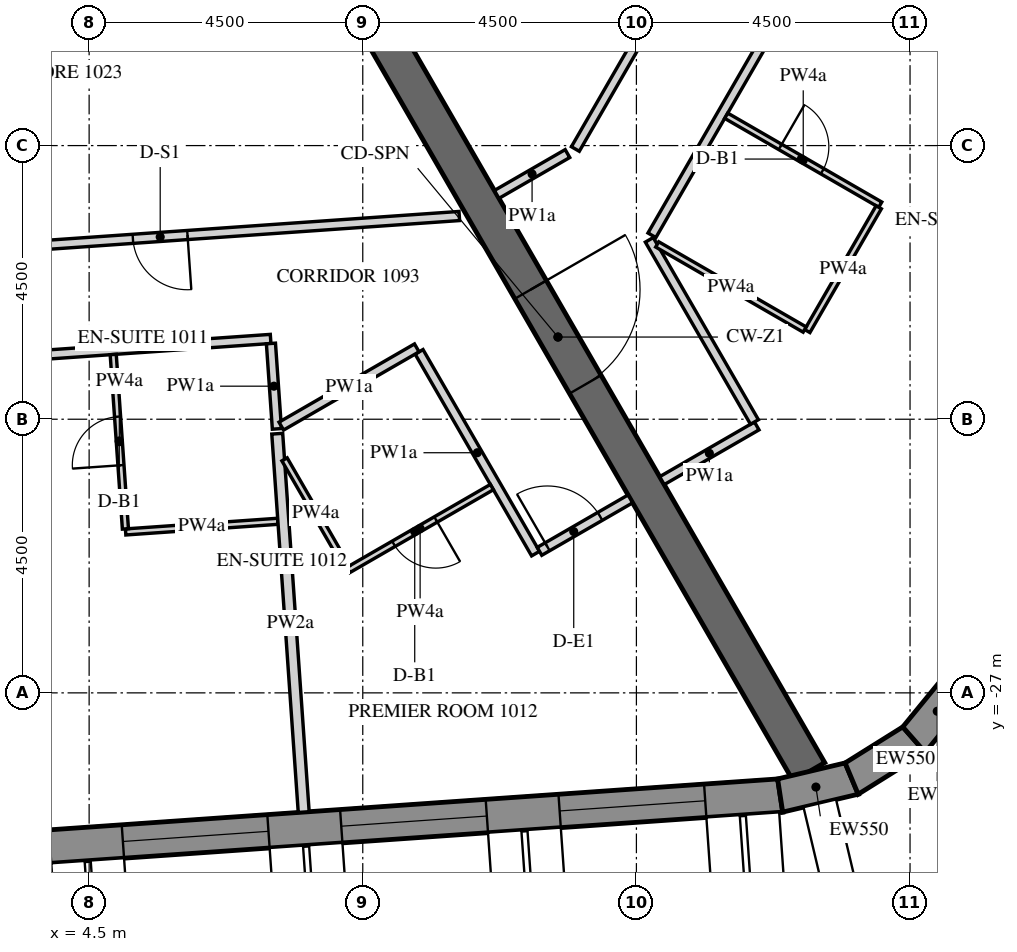
"""IFC4 building model, lengths in metres.
Left out: names, types, materials, properties, quantities, classifications, styles, units other than length and angle.
Written with IfcOpenShell. Run it as: python <this file> out.ifc"""

import sys

from ifc_helpers import new_model, si_unit, direction, frame, frame_2d, origin, place, context, subcontext, project, spatial, polyline, rectangle, outline, extrude, element, fill, save


model = new_model("IFC4")
c1 = context("Model", 3, precision=1e-05, world=origin(), true_north=direction((0.0, 1.0)))
c2 = subcontext(c1, "Body", "Model", "MODEL_VIEW")
j1 = project(units=[si_unit("LENGTHUNIT", "METRE"), si_unit("PLANEANGLEUNIT", "RADIAN")], contexts=[c1])
p1 = place(None, origin())
s1 = spatial("IfcSite", under=j1, at=p1, CompositionType="ELEMENT")
p2 = place(p1, origin())
s2 = spatial("IfcBuilding", under=s1, at=p2, CompositionType="ELEMENT")
p3 = place(p2, frame((0.0, 0.0, 135.0)))
s3 = spatial("IfcBuildingStorey", under=s2, at=p3, CompositionType="ELEMENT", Elevation=135.0)
p4 = place(p3, frame((-14.134, -30.786, -0.15), z_axis=(0.0, 0.0, 1.0), x_axis=(0.997564037441, 0.069756657061, 0.0)))
e1 = element("IfcWall", 1, at=p4, inside=s3, PredefinedType="SOLIDWALL", context=c2, shape_type="SweptSolid", body=[
    extrude(outline(polyline([(-0.026, -0.275), (30.094, -0.275), (30.049, 0.275), (0.026, 0.275), (-0.026, -0.275)])), origin(), (0.0, 0.0, 1.0), 3.9),
])
p5 = place(p4, frame((1.236, 0.0, 1.05)))
e2 = element("IfcOpeningElement", 2, at=p5, cuts=e1, PredefinedType="OPENING", context=c2, shape_type="SweptSolid", body=[
    extrude(rectangle(XDim=2.4, YDim=2.4, at=frame_2d((1.2, 1.2))), frame((0.0, 0.285, 0.0), z_axis=(0.0, -1.0, 0.0), x_axis=(1.0, 0.0, 0.0)), (0.0, 0.0, 1.0), 0.57),
])
p6 = place(p4, frame((4.835, 0.0, 1.05)))
e3 = element("IfcOpeningElement", 3, at=p6, cuts=e1, PredefinedType="OPENING", context=c2, shape_type="SweptSolid", body=[
    extrude(rectangle(XDim=2.4, YDim=2.4, at=frame_2d((1.2, 1.2))), frame((0.0, 0.285, 0.0), z_axis=(0.0, -1.0, 0.0), x_axis=(1.0, 0.0, 0.0)), (0.0, 0.0, 1.0), 0.57),
])
p7 = place(p4, frame((8.436, 0.0, 1.05)))
e4 = element("IfcOpeningElement", 4, at=p7, cuts=e1, PredefinedType="OPENING", context=c2, shape_type="SweptSolid", body=[
    extrude(rectangle(XDim=2.4, YDim=2.4, at=frame_2d((1.2, 1.2))), frame((0.0, 0.285, 0.0), z_axis=(0.0, -1.0, 0.0), x_axis=(1.0, 0.0, 0.0)), (0.0, 0.0, 1.0), 0.57),
])
p8 = place(p4, frame((12.035, 0.0, 1.05)))
e5 = element("IfcOpeningElement", 5, at=p8, cuts=e1, PredefinedType="OPENING", context=c2, shape_type="SweptSolid", body=[
    extrude(rectangle(XDim=2.4, YDim=2.4, at=frame_2d((1.2, 1.2))), frame((0.0, 0.285, 0.0), z_axis=(0.0, -1.0, 0.0), x_axis=(1.0, 0.0, 0.0)), (0.0, 0.0, 1.0), 0.57),
])
p9 = place(p4, frame((15.635, 0.0, 1.05)))
e6 = element("IfcOpeningElement", 6, at=p9, cuts=e1, PredefinedType="OPENING", context=c2, shape_type="SweptSolid", body=[
    extrude(rectangle(XDim=2.4, YDim=2.4, at=frame_2d((1.2, 1.2))), frame((0.0, 0.285, 0.0), z_axis=(0.0, -1.0, 0.0), x_axis=(1.0, 0.0, 0.0)), (0.0, 0.0, 1.0), 0.57),
])
p10 = place(p4, frame((19.236, 0.0, 1.05)))
e7 = element("IfcOpeningElement", 7, at=p10, cuts=e1, PredefinedType="OPENING", context=c2, shape_type="SweptSolid", body=[
    extrude(rectangle(XDim=2.4, YDim=2.4, at=frame_2d((1.2, 1.2))), frame((0.0, 0.285, 0.0), z_axis=(0.0, -1.0, 0.0), x_axis=(1.0, 0.0, 0.0)), (0.0, 0.0, 1.0), 0.57),
])
p11 = place(p4, frame((22.835, 0.0, 1.05)))
e8 = element("IfcOpeningElement", 8, at=p11, cuts=e1, PredefinedType="OPENING", context=c2, shape_type="SweptSolid", body=[
    extrude(rectangle(XDim=2.4, YDim=2.4, at=frame_2d((1.2, 1.2))), frame((0.0, 0.285, 0.0), z_axis=(0.0, -1.0, 0.0), x_axis=(1.0, 0.0, 0.0)), (0.0, 0.0, 1.0), 0.57),
])
p12 = place(p4, frame((26.436, 0.0, 1.05)))
e9 = element("IfcOpeningElement", 9, at=p12, cuts=e1, PredefinedType="OPENING", context=c2, shape_type="SweptSolid", body=[
    extrude(rectangle(XDim=2.4, YDim=2.4, at=frame_2d((1.2, 1.2))), frame((0.0, 0.285, 0.0), z_axis=(0.0, -1.0, 0.0), x_axis=(1.0, 0.0, 0.0)), (0.0, 0.0, 1.0), 0.57),
])
p13 = place(p3, frame((15.864, -28.688, -0.15), z_axis=(0.0, 0.0, 1.0), x_axis=(0.973063591128, 0.230536868247, 0.0)))
e10 = element("IfcWall", 10, at=p13, inside=s3, PredefinedType="SOLIDWALL", context=c2, shape_type="SweptSolid", body=[
    extrude(outline(polyline([(-0.022, -0.275), (1.253, -0.275), (1.163, 0.275), (0.022, 0.275), (-0.022, -0.275)])), origin(), (0.0, 0.0, 1.0), 3.9),
])
p14 = place(p3, frame((17.04, -28.41, -0.15), z_axis=(0.0, 0.0, 1.0), x_axis=(0.847952888306, 0.530071598195, 0.0)))
e11 = element("IfcWall", 11, at=p14, inside=s3, PredefinedType="SOLIDWALL", context=c2, shape_type="SweptSolid", body=[
    extrude(outline(polyline([(-0.045, -0.275), (1.253, -0.275), (1.163, 0.275), (0.045, 0.275), (-0.045, -0.275)])), origin(), (0.0, 0.0, 1.0), 3.9),
])
p15 = place(p3, frame((18.064, -27.769, -0.15), z_axis=(0.0, 0.0, 1.0), x_axis=(0.633842757806, 0.773461930787, 0.0)))
e12 = element("IfcWall", 12, at=p15, inside=s3, PredefinedType="SOLIDWALL", context=c2, shape_type="SweptSolid", body=[
    extrude(outline(polyline([(-0.045, -0.275), (1.231, -0.275), (1.186, 0.275), (0.045, 0.275), (-0.045, -0.275)])), origin(), (0.0, 0.0, 1.0), 3.9),
])
p16 = place(p3, frame((8.083, -14.0, -0.15), z_axis=(0.0, 0.0, 1.0), x_axis=(0.499997680643, -0.866026742862, 0.0)))
e13 = element("IfcWall", 13, at=p16, inside=s3, PredefinedType="SHEAR", context=c2, shape_type="SweptSolid", body=[
    extrude(rectangle(XDim=16.509, YDim=0.6, at=frame_2d((8.254, 0.0))), origin(), (0.0, 0.0, 1.0), 3.9),
])
p17 = place(p16, frame((7.354, 0.0, 0.15)))
e14 = element("IfcOpeningElement", 14, at=p17, cuts=e13, PredefinedType="OPENING", context=c2, shape_type="SweptSolid", body=[
    extrude(rectangle(XDim=1.8, YDim=2.4, at=frame_2d((0.9, 1.2))), frame((0.0, 0.31, 0.0), z_axis=(0.0, -1.0, 0.0), x_axis=(1.0, 0.0, 0.0)), (0.0, 0.0, 1.0), 0.62),
])
p18 = place(p3, frame((-11.902, -22.535, 0.0), z_axis=(0.0, 0.0, 1.0), x_axis=(0.997563830208, 0.069759620556, 0.0)))
e15 = element("IfcWall", 15, at=p18, inside=s3, PredefinedType="PARTITIONING", context=c2, shape_type="SweptSolid", body=[
    extrude(rectangle(XDim=19.434, YDim=0.15, at=frame_2d((9.717, 0.0))), origin(), (0.0, 0.0, 1.0), 2.838),
])
p19 = place(p18, frame((2.575, 0.0, 0.0)))
e16 = element("IfcOpeningElement", 16, at=p19, cuts=e15, PredefinedType="OPENING", context=c2, shape_type="SweptSolid", body=[
    extrude(rectangle(XDim=1.0, YDim=2.1, at=frame_2d((0.5, 1.05))), frame((0.0, 0.085, 0.0), z_axis=(0.0, -1.0, 0.0), x_axis=(1.0, 0.0, 0.0)), (0.0, 0.0, 1.0), 0.17),
])
p20 = place(p18, frame((12.234, 0.0, 0.0)))
e17 = element("IfcOpeningElement", 17, at=p20, cuts=e15, PredefinedType="OPENING", context=c2, shape_type="SweptSolid", body=[
    extrude(rectangle(XDim=1.0, YDim=2.1, at=frame_2d((0.5, 1.05))), frame((0.0, 0.085, 0.0), z_axis=(0.0, -1.0, 0.0), x_axis=(1.0, 0.0, 0.0)), (0.0, 0.0, 1.0), 0.17),
])
p21 = place(p3, frame((7.49, -21.254, 0.0), z_axis=(0.0, 0.0, 1.0), x_axis=(0.069718673592, -0.997566692784, 0.0)))
e18 = element("IfcWall", 18, at=p21, inside=s3, PredefinedType="PARTITIONING", context=c2, shape_type="SweptSolid", body=[
    extrude(rectangle(XDim=1.408, YDim=0.15, at=frame_2d((0.704, 0.0))), origin(), (0.0, 0.0, 1.0), 2.838),
])
p22 = place(p3, frame((9.926, -21.392, 0.0), z_axis=(0.0, 0.0, 1.0), x_axis=(0.500031306162, -0.866007328409, 0.0)))
e19 = element("IfcWall", 19, at=p22, inside=s3, PredefinedType="PARTITIONING", context=c2, shape_type="SweptSolid", body=[
    extrude(rectangle(XDim=3.832, YDim=0.15, at=frame_2d((1.916, 0.0))), origin(), (0.0, 0.0, 1.0), 2.838),
])
p23 = place(p3, frame((11.906, -24.673, 0.0), z_axis=(0.0, 0.0, 1.0), x_axis=(0.866013532718, 0.500020560727, 0.0)))
e20 = element("IfcWall", 20, at=p23, inside=s3, PredefinedType="PARTITIONING", context=c2, shape_type="SweptSolid", body=[
    extrude(rectangle(XDim=1.725, YDim=0.15, at=frame_2d((0.863, 0.0))), origin(), (0.0, 0.0, 1.0), 2.838),
])
p24 = place(p23, frame((0.15, 0.0, 0.0)))
e21 = element("IfcOpeningElement", 21, at=p24, cuts=e20, PredefinedType="OPENING", context=c2, shape_type="SweptSolid", body=[
    extrude(rectangle(XDim=1.0, YDim=2.1, at=frame_2d((0.5, 1.05))), frame((0.0, 0.085, 0.0), z_axis=(0.0, -1.0, 0.0), x_axis=(1.0, 0.0, 0.0)), (0.0, 0.0, 1.0), 0.17),
])
p25 = place(p3, frame((7.66, -22.613, 0.0), z_axis=(0.0, 0.0, 1.0), x_axis=(0.866003870164, 0.500037295471, 0.0)))
e22 = element("IfcWall", 22, at=p25, inside=s3, PredefinedType="PARTITIONING", context=c2, shape_type="SweptSolid", body=[
    extrude(rectangle(XDim=2.573, YDim=0.15, at=frame_2d((1.287, 0.0))), origin(), (0.0, 0.0, 1.0), 2.838),
])
p26 = place(p3, frame((10.587, -19.158, 0.0), z_axis=(0.0, 0.0, 1.0), x_axis=(-0.997565137136, -0.069740928955, 0.0)))
e23 = element("IfcWall", 23, at=p26, inside=s3, PredefinedType="PARTITIONING", context=c2, shape_type="SweptSolid", body=[
    extrude(rectangle(XDim=9.861, YDim=0.15, at=frame_2d((4.931, 0.0))), origin(), (0.0, 0.0, 1.0), 2.838),
])
p27 = place(p26, frame((4.481, 0.0, 0.0)))
e24 = element("IfcOpeningElement", 24, at=p27, cuts=e23, PredefinedType="OPENING", context=c2, shape_type="SweptSolid", body=[
    extrude(rectangle(XDim=0.9, YDim=2.1, at=frame_2d((0.45, 1.05))), frame((0.0, 0.085, 0.0), z_axis=(0.0, -1.0, 0.0), x_axis=(1.0, 0.0, 0.0)), (0.0, 0.0, 1.0), 0.17),
])
p28 = place(p3, frame((13.92, -23.51, 0.0), z_axis=(0.0, 0.0, 1.0), x_axis=(0.866047807691, 0.499961193289, 0.0)))
e25 = element("IfcWall", 25, at=p28, inside=s3, PredefinedType="PARTITIONING", context=c2, shape_type="SweptSolid", body=[
    extrude(rectangle(XDim=1.8, YDim=0.15, at=frame_2d((0.9, 0.0))), origin(), (0.0, 0.0, 1.0), 2.838),
])
p29 = place(p3, frame((15.441, -22.545, 0.0), z_axis=(0.0, 0.0, 1.0), x_axis=(-0.500003541824, 0.866023358902, 0.0)))
e26 = element("IfcWall", 26, at=p29, inside=s3, PredefinedType="PARTITIONING", context=c2, shape_type="SweptSolid", body=[
    extrude(rectangle(XDim=3.458, YDim=0.15, at=frame_2d((1.729, 0.0))), origin(), (0.0, 0.0, 1.0), 2.838),
])
p30 = place(p3, frame((13.755, -19.475, 0.0), z_axis=(0.0, 0.0, 1.0), x_axis=(0.50000013933, 0.866025323342, 0.0)))
e27 = element("IfcWall", 27, at=p30, inside=s3, PredefinedType="PARTITIONING", context=c2, shape_type="SweptSolid", body=[
    extrude(rectangle(XDim=23.517, YDim=0.15, at=frame_2d((11.758, 0.0))), origin(), (0.0, 0.0, 1.0), 2.838),
])
p31 = place(p30, frame((4.456, 0.0, 0.0)))
e28 = element("IfcOpeningElement", 28, at=p31, cuts=e27, PredefinedType="OPENING", context=c2, shape_type="SweptSolid", body=[
    extrude(rectangle(XDim=1.0, YDim=2.1, at=frame_2d((0.5, 1.05))), frame((0.0, 0.085, 0.0), z_axis=(0.0, -1.0, 0.0), x_axis=(1.0, 0.0, 0.0)), (0.0, 0.0, 1.0), 0.17),
])
p32 = place(p30, frame((13.699, 0.0, 0.0)))
e29 = element("IfcOpeningElement", 29, at=p32, cuts=e27, PredefinedType="OPENING", context=c2, shape_type="SweptSolid", body=[
    extrude(rectangle(XDim=1.0, YDim=2.1, at=frame_2d((0.5, 1.05))), frame((0.0, 0.085, 0.0), z_axis=(0.0, -1.0, 0.0), x_axis=(1.0, 0.0, 0.0)), (0.0, 0.0, 1.0), 0.17),
])
p33 = place(p30, frame((21.658, 0.0, 0.0)))
e30 = element("IfcOpeningElement", 30, at=p33, cuts=e27, PredefinedType="OPENING", context=c2, shape_type="SweptSolid", body=[
    extrude(rectangle(XDim=1.0, YDim=2.1, at=frame_2d((0.5, 1.05))), frame((0.0, 0.085, 0.0), z_axis=(0.0, -1.0, 0.0), x_axis=(1.0, 0.0, 0.0)), (0.0, 0.0, 1.0), 0.17),
])
p34 = place(p3, frame((16.643, -10.874, 0.0), z_axis=(0.0, 0.0, 1.0), x_axis=(-0.50000192383, -0.866024293058, 0.0)))
e31 = element("IfcWall", 31, at=p34, inside=s3, PredefinedType="PARTITIONING", context=c2, shape_type="SweptSolid", body=[
    extrude(rectangle(XDim=8.293, YDim=0.15, at=frame_2d((4.146, 0.0))), origin(), (0.0, 0.0, 1.0), 2.838),
])
p35 = place(p34, frame((3.697, 0.0, 0.0)))
e32 = element("IfcOpeningElement", 32, at=p35, cuts=e31, PredefinedType="OPENING", context=c2, shape_type="SweptSolid", body=[
    extrude(rectangle(XDim=0.9, YDim=2.1, at=frame_2d((0.45, 1.05))), frame((0.0, 0.085, 0.0), z_axis=(0.0, -1.0, 0.0), x_axis=(1.0, 0.0, 0.0)), (0.0, 0.0, 1.0), 0.17),
])
p36 = place(p3, frame((12.366, -18.131, 0.0), z_axis=(0.0, 0.0, 1.0), x_axis=(-0.866043397086, -0.499968833392, 0.0)))
e33 = element("IfcWall", 33, at=p36, inside=s3, PredefinedType="PARTITIONING", context=c2, shape_type="SweptSolid", body=[
    extrude(rectangle(XDim=1.344, YDim=0.15, at=frame_2d((0.672, 0.0))), origin(), (0.0, 0.0, 1.0), 2.838),
])
p37 = place(p3, frame((7.604, -24.178, 0.0), z_axis=(0.0, 0.0, 1.0), x_axis=(-0.997565196586, -0.069740078583, 0.0)))
e34 = element("IfcWall", 34, at=p37, inside=s3, PredefinedType="PARTITIONING", context=c2, shape_type="SweptSolid", body=[
    extrude(rectangle(XDim=2.51, YDim=0.1, at=frame_2d((1.255, 0.0))), origin(), (0.0, 0.0, 1.0), 2.838),
])
p38 = place(p3, frame((5.097, -24.304, 0.0), z_axis=(0.0, 0.0, 1.0), x_axis=(-0.069804620828, 0.99756068232, 0.0)))
e35 = element("IfcWall", 35, at=p38, inside=s3, PredefinedType="PARTITIONING", context=c2, shape_type="SweptSolid", body=[
    extrude(rectangle(XDim=2.875, YDim=0.1, at=frame_2d((1.438, 0.0))), origin(), (0.0, 0.0, 1.0), 2.838),
])
p39 = place(p38, frame((1.05, 0.0, 0.0)))
e36 = element("IfcOpeningElement", 36, at=p39, cuts=e35, PredefinedType="OPENING", context=c2, shape_type="SweptSolid", body=[
    extrude(rectangle(XDim=0.8, YDim=2.1, at=frame_2d((0.4, 1.05))), frame((0.0, 0.06, 0.0), z_axis=(0.0, -1.0, 0.0), x_axis=(1.0, 0.0, 0.0)), (0.0, 0.0, 1.0), 0.12),
])
p40 = place(p3, frame((8.029, -28.96, 0.0), z_axis=(0.0, 0.0, 1.0), x_axis=(-0.069750446855, 0.997564471683, 0.0)))
e37 = element("IfcWall", 37, at=p40, inside=s3, PredefinedType="PARTITIONING", context=c2, shape_type="SweptSolid", body=[
    extrude(rectangle(XDim=6.237, YDim=0.18, at=frame_2d((3.119, 0.0))), origin(), (0.0, 0.0, 1.0), 2.838),
])
p41 = place(p3, frame((11.123, -23.616, 0.0), z_axis=(0.0, 0.0, 1.0), x_axis=(-0.866034909742, -0.499983534837, 0.0)))
e38 = element("IfcWall", 38, at=p41, inside=s3, PredefinedType="PARTITIONING", context=c2, shape_type="SweptSolid", body=[
    extrude(rectangle(XDim=2.725, YDim=0.1, at=frame_2d((1.363, 0.0))), origin(), (0.0, 0.0, 1.0), 2.838),
])
p42 = place(p41, frame((1.065, 0.0, 0.0)))
e39 = element("IfcOpeningElement", 39, at=p42, cuts=e38, PredefinedType="OPENING", context=c2, shape_type="SweptSolid", body=[
    extrude(rectangle(XDim=0.8, YDim=2.1, at=frame_2d((0.4, 1.05))), frame((0.0, 0.06, 0.0), z_axis=(0.0, -1.0, 0.0), x_axis=(1.0, 0.0, 0.0)), (0.0, 0.0, 1.0), 0.12),
])
p43 = place(p3, frame((8.738, -24.935, 0.0), z_axis=(0.0, 0.0, 1.0), x_axis=(-0.500045446624, 0.865999163574, 0.0)))
e40 = element("IfcWall", 40, at=p43, inside=s3, PredefinedType="PARTITIONING", context=c2, shape_type="SweptSolid", body=[
    extrude(rectangle(XDim=2.05, YDim=0.1, at=frame_2d((1.025, 0.0))), origin(), (0.0, 0.0, 1.0), 2.838),
])
p44 = place(p3, frame((14.977, -17.509, 0.0), z_axis=(0.0, 0.0, 1.0), x_axis=(0.866046596414, -0.499963291492, 0.0)))
e41 = element("IfcWall", 41, at=p44, inside=s3, PredefinedType="PARTITIONING", context=c2, shape_type="SweptSolid", body=[
    extrude(rectangle(XDim=2.925, YDim=0.1, at=frame_2d((1.462, 0.0))), origin(), (0.0, 0.0, 1.0), 2.838),
])
p45 = place(p44, frame((1.025, 0.0, 0.0)))
e42 = element("IfcOpeningElement", 42, at=p45, cuts=e41, PredefinedType="OPENING", context=c2, shape_type="SweptSolid", body=[
    extrude(rectangle(XDim=0.8, YDim=2.1, at=frame_2d((0.4, 1.05))), frame((0.0, 0.06, 0.0), z_axis=(0.0, -1.0, 0.0), x_axis=(1.0, 0.0, 0.0)), (0.0, 0.0, 1.0), 0.12),
])
p46 = place(p3, frame((17.485, -19.015, 0.0), z_axis=(0.0, 0.0, 1.0), x_axis=(-0.500016218704, -0.866016039709, 0.0)))
e43 = element("IfcWall", 43, at=p46, inside=s3, PredefinedType="PARTITIONING", context=c2, shape_type="SweptSolid", body=[
    extrude(rectangle(XDim=2.35, YDim=0.1, at=frame_2d((1.175, 0.0))), origin(), (0.0, 0.0, 1.0), 2.838),
])
p47 = place(p3, frame((16.267, -21.025, 0.0), z_axis=(0.0, 0.0, 1.0), x_axis=(-0.866034573852, 0.49998411664, 0.0)))
e44 = element("IfcWall", 44, at=p47, inside=s3, PredefinedType="PARTITIONING", context=c2, shape_type="SweptSolid", body=[
    extrude(rectangle(XDim=2.8, YDim=0.1, at=frame_2d((1.4, 0.0))), origin(), (0.0, 0.0, 1.0), 2.838),
])
p48 = place(p3, frame((24.31, -16.794, 0.0), z_axis=(0.0, 0.0, 1.0), x_axis=(-0.866027174938, 0.499996932259, 0.0)))
e45 = element("IfcWall", 45, at=p48, inside=s3, PredefinedType="PARTITIONING", context=c2, shape_type="SweptSolid", body=[
    extrude(rectangle(XDim=7.725, YDim=0.18, at=frame_2d((3.863, 0.0))), origin(), (0.0, 0.0, 1.0), 2.838),
])
p49 = place(p10, frame((0.0, 0.205, 0.0)))
e46 = element("IfcWindow", 46, at=p49, inside=s3, PartitioningType="DOUBLE_PANEL_VERTICAL", PredefinedType="WINDOW", context=c2, shape_type="SweptSolid", body=[
    extrude(rectangle(XDim=2.4, YDim=2.4, at=frame_2d((1.2, 1.2))), frame((0.0, 0.03, 0.0), z_axis=(0.0, -1.0, 0.0), x_axis=(1.0, 0.0, 0.0)), (0.0, 0.0, 1.0), 0.06),
])
fill(e7, e46)
p50 = place(p11, frame((0.0, 0.205, 0.0)))
e47 = element("IfcWindow", 47, at=p50, inside=s3, PartitioningType="DOUBLE_PANEL_VERTICAL", PredefinedType="WINDOW", context=c2, shape_type="SweptSolid", body=[
    extrude(rectangle(XDim=2.4, YDim=2.4, at=frame_2d((1.2, 1.2))), frame((0.0, 0.03, 0.0), z_axis=(0.0, -1.0, 0.0), x_axis=(1.0, 0.0, 0.0)), (0.0, 0.0, 1.0), 0.06),
])
fill(e8, e47)
p51 = place(p12, frame((0.0, 0.205, 0.0)))
e48 = element("IfcWindow", 48, at=p51, inside=s3, PartitioningType="DOUBLE_PANEL_VERTICAL", PredefinedType="WINDOW", context=c2, shape_type="SweptSolid", body=[
    extrude(rectangle(XDim=2.4, YDim=2.4, at=frame_2d((1.2, 1.2))), frame((0.0, 0.03, 0.0), z_axis=(0.0, -1.0, 0.0), x_axis=(1.0, 0.0, 0.0)), (0.0, 0.0, 1.0), 0.06),
])
fill(e9, e48)
p52 = place(p17, origin())
e49 = element("IfcDoor", 49, at=p52, inside=s3, OperationType="DOUBLE_DOOR_SINGLE_SWING", PredefinedType="DOOR", context=c2, shape_type="SweptSolid", body=[
    extrude(rectangle(XDim=1.8, YDim=2.4, at=frame_2d((0.9, 1.2))), frame((0.0, 0.025, 0.0), z_axis=(0.0, -1.0, 0.0), x_axis=(1.0, 0.0, 0.0)), (0.0, 0.0, 1.0), 0.05),
])
fill(e14, e49)
p53 = place(p39, origin())
e50 = element("IfcDoor", 50, at=p53, inside=s3, OperationType="SINGLE_SWING_RIGHT", PredefinedType="DOOR", context=c2, shape_type="SweptSolid", body=[
    extrude(rectangle(XDim=0.8, YDim=2.1, at=frame_2d((0.4, 1.05))), frame((0.0, 0.025, 0.0), z_axis=(0.0, -1.0, 0.0), x_axis=(1.0, 0.0, 0.0)), (0.0, 0.0, 1.0), 0.05),
])
fill(e36, e50)
p54 = place(p24, origin())
e51 = element("IfcDoor", 51, at=p54, inside=s3, OperationType="SINGLE_SWING_RIGHT", PredefinedType="DOOR", context=c2, shape_type="SweptSolid", body=[
    extrude(rectangle(XDim=1.0, YDim=2.1, at=frame_2d((0.5, 1.05))), frame((0.0, 0.025, 0.0), z_axis=(0.0, -1.0, 0.0), x_axis=(1.0, 0.0, 0.0)), (0.0, 0.0, 1.0), 0.05),
])
fill(e21, e51)
p55 = place(p42, origin())
e52 = element("IfcDoor", 52, at=p55, inside=s3, OperationType="SINGLE_SWING_LEFT", PredefinedType="DOOR", context=c2, shape_type="SweptSolid", body=[
    extrude(rectangle(XDim=0.8, YDim=2.1, at=frame_2d((0.4, 1.05))), frame((0.0, 0.025, 0.0), z_axis=(0.0, -1.0, 0.0), x_axis=(1.0, 0.0, 0.0)), (0.0, 0.0, 1.0), 0.05),
])
fill(e39, e52)
p56 = place(p45, origin())
e53 = element("IfcDoor", 53, at=p56, inside=s3, OperationType="SINGLE_SWING_RIGHT", PredefinedType="DOOR", context=c2, shape_type="SweptSolid", body=[
    extrude(rectangle(XDim=0.8, YDim=2.1, at=frame_2d((0.4, 1.05))), frame((0.0, 0.025, 0.0), z_axis=(0.0, -1.0, 0.0), x_axis=(1.0, 0.0, 0.0)), (0.0, 0.0, 1.0), 0.05),
])
fill(e42, e53)
p57 = place(p27, origin())
e54 = element("IfcDoor", 54, at=p57, inside=s3, OperationType="SINGLE_SWING_RIGHT", PredefinedType="DOOR", context=c2, shape_type="SweptSolid", body=[
    extrude(rectangle(XDim=0.9, YDim=2.1, at=frame_2d((0.45, 1.05))), frame((0.0, 0.025, 0.0), z_axis=(0.0, -1.0, 0.0), x_axis=(1.0, 0.0, 0.0)), (0.0, 0.0, 1.0), 0.05),
])
fill(e24, e54)
save(model, sys.argv[1])
